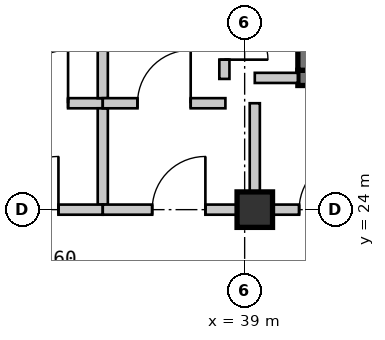
"""IFC4 building model, lengths in metres.
Left out: names, types, materials, properties, quantities, classifications, styles, units other than length and angle.
Written with IfcOpenShell. Run it as: python <this file> out.ifc"""

import sys

from ifc_helpers import new_model, si_unit, direction, frame, frame_2d, origin, origin_2d, place, context, subcontext, project, spatial, rectangle, extrude, source, transform, mapped, element, fill, save


model = new_model("IFC4")
c1 = context("Model", 3, precision=1e-05, world=origin(), true_north=direction((0.0, 1.0)))
c2 = subcontext(c1, "Body", "Model", "MODEL_VIEW")
j1 = project(units=[si_unit("LENGTHUNIT", "METRE"), si_unit("PLANEANGLEUNIT", "RADIAN")], contexts=[c1])
p1 = place(None, origin())
s1 = spatial("IfcSite", under=j1, at=p1, CompositionType="ELEMENT")
p2 = place(p1, origin())
s2 = spatial("IfcBuilding", under=s1, at=p2, CompositionType="ELEMENT")
p3 = place(p2, frame((0.0, 0.0, 65.1)))
s3 = spatial("IfcBuildingStorey", under=s2, at=p3, CompositionType="ELEMENT", Elevation=65.1)
m1 = source(origin(), c2, "Body", "SweptSolid", [
    extrude(rectangle(XDim=0.7, YDim=0.7, at=origin_2d()), origin(), (0.0, 0.0, 1.0), 3.15),
])
p4 = place(p3, frame((39.2, 24.0, 0.0), z_axis=(0.0, 0.0, 1.0), x_axis=(1.0, 0.0, 0.0)))
e1 = element("IfcColumn", 1, at=p4, inside=s3, PredefinedType="COLUMN", context=c2, shape_type="MappedRepresentation", body=[
    mapped(m1, transform((0.0, 0.0, 0.0), scale=1.0)),
])
m2 = source(origin(), c2, "Body", "SweptSolid", [
    extrude(rectangle(XDim=1.47, YDim=0.3, at=frame_2d((0.735, 0.0))), origin(), (0.0, 0.0, 1.0), 2.93),
])
p5 = place(p3, frame((40.05, 26.6, 0.0), z_axis=(0.0, 0.0, 1.0), x_axis=(1.0, 0.0, 0.0)))
e2 = element("IfcWall", 2, at=p5, inside=s3, PredefinedType="SHEAR", context=c2, shape_type="MappedRepresentation", body=[
    mapped(m2, transform((0.0, 0.0, 0.0), scale=1.0)),
])
m3 = source(origin(), c2, "Body", "SweptSolid", [
    extrude(rectangle(XDim=1.3, YDim=0.3, at=frame_2d((0.65, 0.0))), origin(), (0.0, 0.0, 1.0), 2.93),
])
p6 = place(p3, frame((40.2, 28.05, 0.0), z_axis=(0.0, 0.0, 1.0), x_axis=(0.0, -1.0, 0.0)))
e3 = element("IfcWall", 3, at=p6, inside=s3, PredefinedType="SHEAR", context=c2, shape_type="MappedRepresentation", body=[
    mapped(m3, transform((0.0, 0.0, 0.0), scale=1.0)),
])
m4 = source(origin(), c2, "Body", "SweptSolid", [
    extrude(rectangle(XDim=2.42, YDim=0.2, at=frame_2d((1.21, 0.0))), origin(), (0.0, 0.0, 1.0), 2.93),
])
p7 = place(p3, frame((33.78, 26.1, 0.0), z_axis=(0.0, 0.0, 1.0), x_axis=(1.0, 0.0, 0.0)))
e4 = element("IfcWall", 4, at=p7, inside=s3, PredefinedType="SOLIDWALL", context=c2, shape_type="MappedRepresentation", body=[
    mapped(m4, transform((0.0, 0.0, 0.0), scale=1.0)),
])
m5 = source(origin(), c2, "Body", "SweptSolid", [
    extrude(rectangle(XDim=1.05, YDim=2.1, at=frame_2d((0.525, 1.05))), frame((0.0, 0.11, 0.0), z_axis=(0.0, -1.0, 0.0), x_axis=(1.0, 0.0, 0.0)), (0.0, 0.0, 1.0), 0.22),
])
p8 = place(p7, frame((0.685, 0.0, 0.0)))
e5 = element("IfcOpeningElement", 5, at=p8, cuts=e4, PredefinedType="OPENING", context=c2, shape_type="MappedRepresentation", body=[
    mapped(m5, transform((0.0, 0.0, 0.0), scale=1.0)),
])
m6 = source(origin(), c2, "Body", "SweptSolid", [
    extrude(rectangle(XDim=1.9, YDim=0.2, at=frame_2d((0.95, 0.0))), origin(), (0.0, 0.0, 1.0), 2.93),
])
p9 = place(p3, frame((36.2, 26.0, 0.0), z_axis=(0.0, 0.0, 1.0), x_axis=(0.0, -1.0, 0.0)))
e6 = element("IfcWall", 6, at=p9, inside=s3, PredefinedType="SOLIDWALL", context=c2, shape_type="MappedRepresentation", body=[
    mapped(m6, transform((0.0, 0.0, 0.0), scale=1.0)),
])
m7 = source(origin(), c2, "Body", "SweptSolid", [
    extrude(rectangle(XDim=2.8, YDim=0.2, at=frame_2d((1.4, 0.0))), origin(), (0.0, 0.0, 1.0), 2.47),
])
p10 = place(p3, frame((36.2, 24.0, 0.0), z_axis=(0.0, 0.0, 1.0), x_axis=(-1.0, 0.0, 0.0)))
e7 = element("IfcWall", 7, at=p10, inside=s3, PredefinedType="SOLIDWALL", context=c2, shape_type="MappedRepresentation", body=[
    mapped(m7, transform((0.0, 0.0, 0.0), scale=1.0)),
])
p11 = place(p10, frame((0.875, 0.0, 0.0)))
e8 = element("IfcOpeningElement", 8, at=p11, cuts=e7, PredefinedType="OPENING", context=c2, shape_type="MappedRepresentation", body=[
    mapped(m5, transform((0.0, 0.0, 0.0), scale=1.0)),
])
m8 = source(origin(), c2, "Body", "SweptSolid", [
    extrude(rectangle(XDim=1.9, YDim=0.2, at=frame_2d((0.95, 0.0))), origin(), (0.0, 0.0, 1.0), 2.93),
])
p12 = place(p3, frame((36.2, 28.1, 0.0), z_axis=(0.0, 0.0, 1.0), x_axis=(0.0, -1.0, 0.0)))
e9 = element("IfcWall", 9, at=p12, inside=s3, PredefinedType="SOLIDWALL", context=c2, shape_type="MappedRepresentation", body=[
    mapped(m8, transform((0.0, 0.0, 0.0), scale=1.0)),
])
m9 = source(origin(), c2, "Body", "SweptSolid", [
    extrude(rectangle(XDim=2.42, YDim=0.2, at=frame_2d((1.21, 0.0))), origin(), (0.0, 0.0, 1.0), 2.93),
])
p13 = place(p3, frame((36.2, 26.1, 0.0), z_axis=(0.0, 0.0, 1.0), x_axis=(1.0, 0.0, 0.0)))
e10 = element("IfcWall", 10, at=p13, inside=s3, PredefinedType="SOLIDWALL", context=c2, shape_type="MappedRepresentation", body=[
    mapped(m9, transform((0.0, 0.0, 0.0), scale=1.0)),
])
p14 = place(p13, frame((0.685, 0.0, 0.0)))
e11 = element("IfcOpeningElement", 11, at=p14, cuts=e10, PredefinedType="OPENING", context=c2, shape_type="MappedRepresentation", body=[
    mapped(m5, transform((0.0, 0.0, 0.0), scale=1.0)),
])
m10 = source(origin(), c2, "Body", "SweptSolid", [
    extrude(rectangle(XDim=2.0, YDim=0.2, at=frame_2d((1.0, 0.0))), origin(), (0.0, 0.0, 1.0), 2.47),
])
p15 = place(p3, frame((39.2, 26.1, 0.0), z_axis=(0.0, 0.0, 1.0), x_axis=(0.0, -1.0, 0.0)))
e12 = element("IfcWall", 12, at=p15, inside=s3, PredefinedType="SOLIDWALL", context=c2, shape_type="MappedRepresentation", body=[
    mapped(m10, transform((0.0, 0.0, 0.0), scale=1.0)),
])
m11 = source(origin(), c2, "Body", "SweptSolid", [
    extrude(rectangle(XDim=3.0, YDim=0.2, at=frame_2d((1.5, 0.0))), origin(), (0.0, 0.0, 1.0), 2.47),
])
p16 = place(p3, frame((39.2, 24.0, 0.0), z_axis=(0.0, 0.0, 1.0), x_axis=(-1.0, 0.0, 0.0)))
e13 = element("IfcWall", 13, at=p16, inside=s3, PredefinedType="SOLIDWALL", context=c2, shape_type="MappedRepresentation", body=[
    mapped(m11, transform((0.0, 0.0, 0.0), scale=1.0)),
])
p17 = place(p16, frame((0.975, 0.0, 0.0)))
e14 = element("IfcOpeningElement", 14, at=p17, cuts=e13, PredefinedType="OPENING", context=c2, shape_type="MappedRepresentation", body=[
    mapped(m5, transform((0.0, 0.0, 0.0), scale=1.0)),
])
m12 = source(origin(), c2, "Body", "SweptSolid", [
    extrude(rectangle(XDim=1.47, YDim=0.2, at=frame_2d((0.735, 0.0))), origin(), (0.0, 0.0, 1.0), 2.93),
])
p18 = place(p3, frame((38.6, 28.05, 0.0), z_axis=(0.0, 0.0, 1.0), x_axis=(0.0, -1.0, 0.0)))
e15 = element("IfcWall", 15, at=p18, inside=s3, PredefinedType="SOLIDWALL", context=c2, shape_type="MappedRepresentation", body=[
    mapped(m12, transform((0.0, 0.0, 0.0), scale=1.0)),
])
m13 = source(origin(), c2, "Body", "SweptSolid", [
    extrude(rectangle(XDim=0.86, YDim=2.1, at=frame_2d((0.43, 1.05))), frame((0.0, 0.11, 0.0), z_axis=(0.0, -1.0, 0.0), x_axis=(1.0, 0.0, 0.0)), (0.0, 0.0, 1.0), 0.22),
])
p19 = place(p18, frame((0.23, 0.0, 0.0)))
e16 = element("IfcOpeningElement", 16, at=p19, cuts=e15, PredefinedType="OPENING", context=c2, shape_type="MappedRepresentation", body=[
    mapped(m13, transform((0.0, 0.0, 0.0), scale=1.0)),
])
m14 = source(origin(), c2, "Body", "SweptSolid", [
    extrude(rectangle(XDim=0.85, YDim=0.2, at=frame_2d((0.425, 0.0))), origin(), (0.0, 0.0, 1.0), 2.93),
])
p20 = place(p3, frame((39.2, 26.6, 0.0), z_axis=(0.0, 0.0, 1.0), x_axis=(1.0, 0.0, 0.0)))
e17 = element("IfcWall", 17, at=p20, inside=s3, PredefinedType="SOLIDWALL", context=c2, shape_type="MappedRepresentation", body=[
    mapped(m14, transform((0.0, 0.0, 0.0), scale=1.0)),
])
m15 = source(origin(), c2, "Body", "SweptSolid", [
    extrude(rectangle(XDim=2.3, YDim=0.2, at=frame_2d((1.15, 0.0))), origin(), (0.0, 0.0, 1.0), 2.397),
])
p21 = place(p3, frame((41.5, 24.0, 0.0), z_axis=(0.0, 0.0, 1.0), x_axis=(-1.0, 0.0, 0.0)))
e18 = element("IfcWall", 18, at=p21, inside=s3, PredefinedType="SOLIDWALL", context=c2, shape_type="MappedRepresentation", body=[
    mapped(m15, transform((0.0, 0.0, 0.0), scale=1.0)),
])
p22 = place(p21, frame((0.375, 0.0, 0.0)))
e19 = element("IfcOpeningElement", 19, at=p22, cuts=e18, PredefinedType="OPENING", context=c2, shape_type="MappedRepresentation", body=[
    mapped(m5, transform((0.0, 0.0, 0.0), scale=1.0)),
])
m16 = source(origin(), c2, "Body", "SweptSolid", [
    extrude(rectangle(XDim=1.05, YDim=2.1, at=frame_2d((0.525, 1.05))), frame((0.0, 0.025, 0.0), z_axis=(0.0, -1.0, 0.0), x_axis=(1.0, 0.0, 0.0)), (0.0, 0.0, 1.0), 0.05),
])
p23 = place(p8, origin())
e20 = element("IfcDoor", 20, at=p23, inside=s3, OperationType="SINGLE_SWING_RIGHT", PredefinedType="DOOR", context=c2, shape_type="MappedRepresentation", body=[
    mapped(m16, transform((0.0, 0.0, 0.0), scale=1.0)),
])
fill(e5, e20)
p24 = place(p11, frame((1.05, 0.0, 0.0), z_axis=(0.0, 0.0, 1.0), x_axis=(-1.0, 0.0, 0.0)))
e21 = element("IfcDoor", 21, at=p24, inside=s3, OperationType="SINGLE_SWING_RIGHT", PredefinedType="DOOR", context=c2, shape_type="MappedRepresentation", body=[
    mapped(m16, transform((0.0, 0.0, 0.0), scale=1.0)),
])
fill(e8, e21)
p25 = place(p14, origin())
e22 = element("IfcDoor", 22, at=p25, inside=s3, OperationType="SINGLE_SWING_RIGHT", PredefinedType="DOOR", context=c2, shape_type="MappedRepresentation", body=[
    mapped(m16, transform((0.0, 0.0, 0.0), scale=1.0)),
])
fill(e11, e22)
p26 = place(p17, frame((1.05, 0.0, 0.0), z_axis=(0.0, 0.0, 1.0), x_axis=(-1.0, 0.0, 0.0)))
e23 = element("IfcDoor", 23, at=p26, inside=s3, OperationType="SINGLE_SWING_RIGHT", PredefinedType="DOOR", context=c2, shape_type="MappedRepresentation", body=[
    mapped(m16, transform((0.0, 0.0, 0.0), scale=1.0)),
])
fill(e14, e23)
p27 = place(p22, frame((1.05, 0.0, 0.0), z_axis=(0.0, 0.0, 1.0), x_axis=(-1.0, 0.0, 0.0)))
e24 = element("IfcDoor", 24, at=p27, inside=s3, OperationType="SINGLE_SWING_RIGHT", PredefinedType="DOOR", context=c2, shape_type="MappedRepresentation", body=[
    mapped(m16, transform((0.0, 0.0, 0.0), scale=1.0)),
])
fill(e19, e24)
m17 = source(origin(), c2, "Body", "SweptSolid", [
    extrude(rectangle(XDim=0.86, YDim=2.1, at=frame_2d((0.43, 1.05))), frame((0.0, 0.025, 0.0), z_axis=(0.0, -1.0, 0.0), x_axis=(1.0, 0.0, 0.0)), (0.0, 0.0, 1.0), 0.05),
])
p28 = place(p19, origin())
e25 = element("IfcDoor", 25, at=p28, inside=s3, OperationType="SINGLE_SWING_RIGHT", PredefinedType="DOOR", context=c2, shape_type="MappedRepresentation", body=[
    mapped(m17, transform((0.0, 0.0, 0.0), scale=1.0)),
])
fill(e16, e25)
save(model, sys.argv[1])
